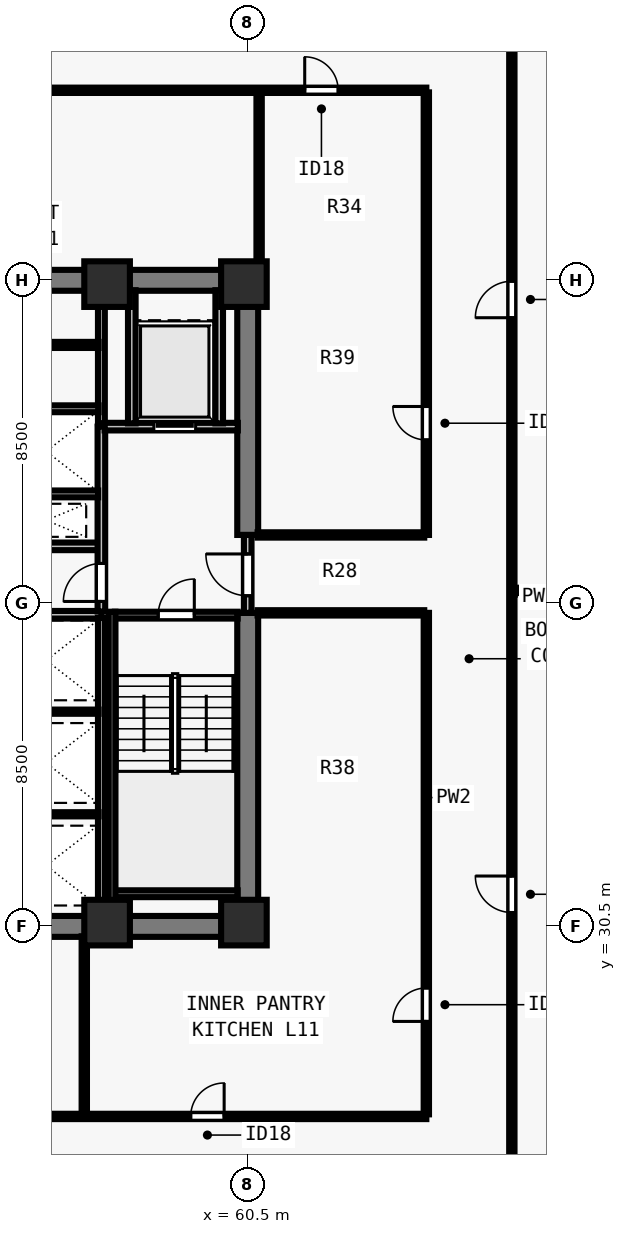
"""IFC4 building model, lengths in metres.
Left out: names, types, materials, properties, quantities, classifications, styles, units other than length and angle.
Written with IfcOpenShell. Run it as: python <this file> out.ifc"""

import sys

from ifc_helpers import new_model, si_unit, direction, frame, frame_2d, origin, origin_2d, place, context, subcontext, project, spatial, rectangle, extrude, element, fill, save


model = new_model("IFC4")
c1 = context("Model", 3, precision=1e-05, world=origin(), true_north=direction((0.0, 1.0)))
c2 = subcontext(c1, "Body", "Model", "MODEL_VIEW")
j1 = project(units=[si_unit("LENGTHUNIT", "METRE"), si_unit("PLANEANGLEUNIT", "RADIAN")], contexts=[c1])
p1 = place(None, origin())
s1 = spatial("IfcSite", under=j1, at=p1, CompositionType="ELEMENT")
p2 = place(p1, origin())
s2 = spatial("IfcBuilding", under=s1, at=p2, CompositionType="ELEMENT")
p3 = place(p2, frame((0.0, 0.0, 44.5)))
s3 = spatial("IfcBuildingStorey", under=s2, at=p3, CompositionType="ELEMENT", Elevation=44.5)
for number, where, z_axis, x_axis in (
    (1, (56.8, 30.6, 0.0), (0.0, 0.0, 1.0), (1.0, 0.0, 0.0)),
    (2, (60.4, 30.6, 0.0), (0.0, 0.0, 1.0), (1.0, 0.0, 0.0)),
    (3, (56.8, 47.4, 0.0), (0.0, 0.0, 1.0), (1.0, 0.0, 0.0)),
    (4, (60.4, 47.4, 0.0), (0.0, 0.0, 1.0), (1.0, 0.0, 0.0)),
):
    element("IfcColumn", number, at=place(p3, frame(where, z_axis=z_axis, x_axis=x_axis)), inside=s3, PredefinedType="COLUMN", context=c2, shape_type="SweptSolid", body=[
        extrude(rectangle(XDim=1.2, YDim=1.2, at=origin_2d()), origin(), (0.0, 0.0, 1.0), 3.5),
    ])
for number, where, z_axis, x_axis in (
    (5, (43.225, 30.5, 0.0), (0.0, 0.0, 1.0), (1.0, 0.0, 0.0)),
    (6, (43.225, 47.5, 0.0), (0.0, 0.0, 1.0), (1.0, 0.0, 0.0)),
):
    element("IfcWall", number, at=place(p3, frame(where, z_axis=z_axis, x_axis=x_axis)), inside=s3, PredefinedType="SHEAR", context=c2, shape_type="SweptSolid", body=[
        extrude(rectangle(XDim=17.55, YDim=0.55, at=frame_2d((8.775, 0.0))), origin(), (0.0, 0.0, 1.0), 3.28),
    ])
p4 = place(p3, frame((60.5, 30.765, 0.0), z_axis=(0.0, 0.0, 1.0), x_axis=(0.0, 1.0, 0.0)))
e7 = element("IfcWall", 7, at=p4, inside=s3, PredefinedType="SHEAR", context=c2, shape_type="SweptSolid", body=[
    extrude(rectangle(XDim=7.985, YDim=0.55, at=frame_2d((3.993, 0.0))), origin(), (0.0, 0.0, 1.0), 3.28),
])
p5 = place(p3, frame((60.5, 40.8, 0.0), z_axis=(0.0, 0.0, 1.0), x_axis=(0.0, 1.0, 0.0)))
e8 = element("IfcWall", 8, at=p5, inside=s3, PredefinedType="SHEAR", context=c2, shape_type="SweptSolid", body=[
    extrude(rectangle(XDim=6.435, YDim=0.55, at=frame_2d((3.218, 0.0))), origin(), (0.0, 0.0, 1.0), 3.28),
])
for number, where, z_axis, x_axis in (
    (9, (53.7, 38.7, 0.0), (0.0, 0.0, 1.0), (1.0, 0.0, 0.0)),
    (10, (53.7, 40.5, 0.0), (0.0, 0.0, 1.0), (1.0, 0.0, 0.0)),
):
    element("IfcWall", number, at=place(p3, frame(where, z_axis=z_axis, x_axis=x_axis)), inside=s3, PredefinedType="SOLIDWALL", context=c2, shape_type="SweptSolid", body=[
        extrude(rectangle(XDim=2.95, YDim=0.2, at=frame_2d((1.475, 0.0))), origin(), (0.0, 0.0, 1.0), 3.28),
    ])
p6 = place(p3, frame((60.5, 38.75, 0.0), z_axis=(0.0, 0.0, 1.0), x_axis=(0.0, 1.0, 0.0)))
e11 = element("IfcWall", 11, at=p6, inside=s3, PredefinedType="SOLIDWALL", context=c2, shape_type="SweptSolid", body=[
    extrude(rectangle(XDim=2.05, YDim=0.2, at=frame_2d((1.025, 0.0))), origin(), (0.0, 0.0, 1.0), 3.28),
])
p7 = place(p6, frame((0.45, 0.0, 0.0)))
e12 = element("IfcOpeningElement", 12, at=p7, cuts=e11, PredefinedType="OPENING", context=c2, shape_type="SweptSolid", body=[
    extrude(rectangle(XDim=1.1, YDim=2.15, at=frame_2d((0.55, 1.075))), frame((0.0, 0.11, 0.0), z_axis=(0.0, -1.0, 0.0), x_axis=(1.0, 0.0, 0.0)), (0.0, 0.0, 1.0), 0.22),
])
p8 = place(p3, frame((56.65, 38.785, 0.0), z_axis=(0.0, 0.0, 1.0), x_axis=(0.0, 1.0, 0.0)))
e13 = element("IfcWall", 13, at=p8, inside=s3, PredefinedType="SOLIDWALL", context=c2, shape_type="SweptSolid", body=[
    extrude(rectangle(XDim=4.865, YDim=0.2, at=frame_2d((2.433, 0.0))), origin(), (0.0, 0.0, 1.0), 3.28),
])
p9 = place(p8, frame((0.265, 0.0, 0.0)))
e14 = element("IfcOpeningElement", 14, at=p9, cuts=e13, PredefinedType="OPENING", context=c2, shape_type="SweptSolid", body=[
    extrude(rectangle(XDim=1.0, YDim=2.15, at=frame_2d((0.5, 1.075))), frame((0.0, 0.11, 0.0), z_axis=(0.0, -1.0, 0.0), x_axis=(1.0, 0.0, 0.0)), (0.0, 0.0, 1.0), 0.22),
])
p10 = place(p3, frame((56.735, 43.65, 0.0), z_axis=(0.0, 0.0, 1.0), x_axis=(1.0, 0.0, 0.0)))
e15 = element("IfcWall", 15, at=p10, inside=s3, PredefinedType="SOLIDWALL", context=c2, shape_type="SweptSolid", body=[
    extrude(rectangle(XDim=3.505, YDim=0.2, at=frame_2d((1.752, 0.0))), origin(), (0.0, 0.0, 1.0), 3.28),
])
p11 = place(p10, frame((1.295, 0.0, 0.0)))
e16 = element("IfcOpeningElement", 16, at=p11, cuts=e15, PredefinedType="OPENING", context=c2, shape_type="SweptSolid", body=[
    extrude(rectangle(XDim=1.1, YDim=2.2, at=frame_2d((0.55, 1.1))), frame((0.0, 0.11, 0.0), z_axis=(0.0, -1.0, 0.0), x_axis=(1.0, 0.0, 0.0)), (0.0, 0.0, 1.0), 0.22),
])
for number, where, z_axis, x_axis in (
    (17, (57.45, 43.735, 0.0), (0.0, 0.0, 1.0), (0.0, 1.0, 0.0)),
    (18, (59.75, 43.735, 0.0), (0.0, 0.0, 1.0), (0.0, 1.0, 0.0)),
):
    element("IfcWall", number, at=place(p3, frame(where, z_axis=z_axis, x_axis=x_axis)), inside=s3, PredefinedType="SOLIDWALL", context=c2, shape_type="SweptSolid", body=[
        extrude(rectangle(XDim=3.505, YDim=0.2, at=frame_2d((1.752, 0.0))), origin(), (0.0, 0.0, 1.0), 3.28),
    ])
p12 = place(p3, frame((56.65, 30.76, 0.0), z_axis=(0.0, 0.0, 1.0), x_axis=(0.0, 1.0, 0.0)))
e19 = element("IfcWall", 19, at=p12, inside=s3, PredefinedType="SOLIDWALL", context=c2, shape_type="SweptSolid", body=[
    extrude(rectangle(XDim=7.855, YDim=0.18, at=frame_2d((3.927, 0.0))), origin(), (0.0, 0.0, 1.0), 3.28),
])
for number, where, z_axis, x_axis in (
    (20, (53.785, 33.45, 0.0), (0.0, 0.0, 1.0), (1.0, 0.0, 0.0)),
    (21, (53.785, 36.15, 0.0), (0.0, 0.0, 1.0), (1.0, 0.0, 0.0)),
):
    element("IfcWall", number, at=place(p3, frame(where, z_axis=z_axis, x_axis=x_axis)), inside=s3, PredefinedType="PARTITIONING", context=c2, shape_type="SweptSolid", body=[
        extrude(rectangle(XDim=2.79, YDim=0.11, at=frame_2d((1.395, 0.0))), origin(), (0.0, 0.0, 1.0), 3.28),
    ])
p13 = place(p3, frame((56.65, 43.735, 0.0), z_axis=(0.0, 0.0, 1.0), x_axis=(0.0, 1.0, 0.0)))
e22 = element("IfcWall", 22, at=p13, inside=s3, PredefinedType="SOLIDWALL", context=c2, shape_type="SweptSolid", body=[
    extrude(rectangle(XDim=3.505, YDim=0.18, at=frame_2d((1.752, 0.0))), origin(), (0.0, 0.0, 1.0), 3.28),
])
p14 = place(p3, frame((53.785, 41.88, 0.0), z_axis=(0.0, 0.0, 1.0), x_axis=(1.0, 0.0, 0.0)))
e23 = element("IfcWall", 23, at=p14, inside=s3, PredefinedType="SOLIDWALL", context=c2, shape_type="SweptSolid", body=[
    extrude(rectangle(XDim=2.78, YDim=0.18, at=frame_2d((1.39, 0.0))), origin(), (0.0, 0.0, 1.0), 3.28),
])
p15 = place(p3, frame((53.785, 44.12, 0.0), z_axis=(0.0, 0.0, 1.0), x_axis=(1.0, 0.0, 0.0)))
e24 = element("IfcWall", 24, at=p15, inside=s3, PredefinedType="SOLIDWALL", context=c2, shape_type="SweptSolid", body=[
    extrude(rectangle(XDim=2.79, YDim=0.18, at=frame_2d((1.395, 0.0))), origin(), (0.0, 0.0, 1.0), 3.28),
])
p16 = place(p3, frame((53.785, 45.8, 0.0), z_axis=(0.0, 0.0, 1.0), x_axis=(1.0, 0.0, 0.0)))
e25 = element("IfcWall", 25, at=p16, inside=s3, PredefinedType="PARTITIONING", context=c2, shape_type="SweptSolid", body=[
    extrude(rectangle(XDim=2.79, YDim=0.16, at=frame_2d((1.395, 0.0))), origin(), (0.0, 0.0, 1.0), 3.28),
])
p17 = place(p3, frame((67.45, 23.305, 0.0), z_axis=(0.0, 0.0, 1.0), x_axis=(0.0, 1.0, 0.0)))
e26 = element("IfcWall", 26, at=p17, inside=s3, PredefinedType="PARTITIONING", context=c2, shape_type="SweptSolid", body=[
    extrude(rectangle(XDim=31.39, YDim=0.14, at=frame_2d((15.695, 0.0))), origin(), (0.0, 0.0, 1.0), 3.28),
])
p18 = place(p17, frame((7.561, 0.0, 0.0)))
e27 = element("IfcOpeningElement", 27, at=p18, cuts=e26, PredefinedType="OPENING", context=c2, shape_type="SweptSolid", body=[
    extrude(rectangle(XDim=0.96, YDim=2.12, at=frame_2d((0.48, 1.06))), frame((0.0, 0.08, 0.0), z_axis=(0.0, -1.0, 0.0), x_axis=(1.0, 0.0, 0.0)), (0.0, 0.0, 1.0), 0.16),
])
p19 = place(p17, frame((23.211, 0.0, 0.0)))
e28 = element("IfcOpeningElement", 28, at=p19, cuts=e26, PredefinedType="OPENING", context=c2, shape_type="SweptSolid", body=[
    extrude(rectangle(XDim=0.96, YDim=2.12, at=frame_2d((0.48, 1.06))), frame((0.0, 0.08, 0.0), z_axis=(0.0, -1.0, 0.0), x_axis=(1.0, 0.0, 0.0)), (0.0, 0.0, 1.0), 0.16),
])
p20 = place(p3, frame((38.8, 25.5, 0.0), z_axis=(0.0, 0.0, 1.0), x_axis=(1.0, 0.0, 0.0)))
e29 = element("IfcWall", 29, at=p20, inside=s3, PredefinedType="PARTITIONING", context=c2, shape_type="SweptSolid", body=[
    extrude(rectangle(XDim=26.4, YDim=0.14, at=frame_2d((13.2, 0.0))), origin(), (0.0, 0.0, 1.0), 3.28),
])
p21 = place(p20, frame((1.2, 0.0, 0.0)))
e30 = element("IfcOpeningElement", 30, at=p21, cuts=e29, PredefinedType="OPENING", context=c2, shape_type="SweptSolid", body=[
    extrude(rectangle(XDim=0.88, YDim=2.1, at=frame_2d((0.44, 1.05))), frame((0.0, 0.08, 0.0), z_axis=(0.0, -1.0, 0.0), x_axis=(1.0, 0.0, 0.0)), (0.0, 0.0, 1.0), 0.16),
])
p22 = place(p20, frame((9.7, 0.0, 0.0)))
e31 = element("IfcOpeningElement", 31, at=p22, cuts=e29, PredefinedType="OPENING", context=c2, shape_type="SweptSolid", body=[
    extrude(rectangle(XDim=0.88, YDim=2.1, at=frame_2d((0.44, 1.05))), frame((0.0, 0.08, 0.0), z_axis=(0.0, -1.0, 0.0), x_axis=(1.0, 0.0, 0.0)), (0.0, 0.0, 1.0), 0.16),
])
p23 = place(p20, frame((20.2, 0.0, 0.0)))
e32 = element("IfcOpeningElement", 32, at=p23, cuts=e29, PredefinedType="OPENING", context=c2, shape_type="SweptSolid", body=[
    extrude(rectangle(XDim=0.88, YDim=2.1, at=frame_2d((0.44, 1.05))), frame((0.0, 0.08, 0.0), z_axis=(0.0, -1.0, 0.0), x_axis=(1.0, 0.0, 0.0)), (0.0, 0.0, 1.0), 0.16),
])
p24 = place(p3, frame((38.8, 52.5, 0.0), z_axis=(0.0, 0.0, 1.0), x_axis=(1.0, 0.0, 0.0)))
e33 = element("IfcWall", 33, at=p24, inside=s3, PredefinedType="PARTITIONING", context=c2, shape_type="SweptSolid", body=[
    extrude(rectangle(XDim=26.4, YDim=0.14, at=frame_2d((13.2, 0.0))), origin(), (0.0, 0.0, 1.0), 3.28),
])
p25 = place(p24, frame((2.2, 0.0, 0.0)))
e34 = element("IfcOpeningElement", 34, at=p25, cuts=e33, PredefinedType="OPENING", context=c2, shape_type="SweptSolid", body=[
    extrude(rectangle(XDim=0.88, YDim=2.1, at=frame_2d((0.44, 1.05))), frame((0.0, 0.08, 0.0), z_axis=(0.0, -1.0, 0.0), x_axis=(1.0, 0.0, 0.0)), (0.0, 0.0, 1.0), 0.16),
])
p26 = place(p24, frame((13.7, 0.0, 0.0)))
e35 = element("IfcOpeningElement", 35, at=p26, cuts=e33, PredefinedType="OPENING", context=c2, shape_type="SweptSolid", body=[
    extrude(rectangle(XDim=0.88, YDim=2.1, at=frame_2d((0.44, 1.05))), frame((0.0, 0.08, 0.0), z_axis=(0.0, -1.0, 0.0), x_axis=(1.0, 0.0, 0.0)), (0.0, 0.0, 1.0), 0.16),
])
p27 = place(p24, frame((23.2, 0.0, 0.0)))
e36 = element("IfcOpeningElement", 36, at=p27, cuts=e33, PredefinedType="OPENING", context=c2, shape_type="SweptSolid", body=[
    extrude(rectangle(XDim=0.88, YDim=2.1, at=frame_2d((0.44, 1.05))), frame((0.0, 0.08, 0.0), z_axis=(0.0, -1.0, 0.0), x_axis=(1.0, 0.0, 0.0)), (0.0, 0.0, 1.0), 0.16),
])
p28 = place(p3, frame((65.2, 25.555, 0.0), z_axis=(0.0, 0.0, 1.0), x_axis=(0.0, 1.0, 0.0)))
e37 = element("IfcWall", 37, at=p28, inside=s3, PredefinedType="PARTITIONING", context=c2, shape_type="SweptSolid", body=[
    extrude(rectangle(XDim=13.195, YDim=0.14, at=frame_2d((6.598, 0.0))), origin(), (0.0, 0.0, 1.0), 3.28),
])
p29 = place(p28, frame((2.445, 0.0, 0.0)))
e38 = element("IfcOpeningElement", 38, at=p29, cuts=e37, PredefinedType="OPENING", context=c2, shape_type="SweptSolid", body=[
    extrude(rectangle(XDim=0.88, YDim=2.1, at=frame_2d((0.44, 1.05))), frame((0.0, 0.08, 0.0), z_axis=(0.0, -1.0, 0.0), x_axis=(1.0, 0.0, 0.0)), (0.0, 0.0, 1.0), 0.16),
])
p30 = place(p3, frame((65.2, 40.8, 0.0), z_axis=(0.0, 0.0, 1.0), x_axis=(0.0, 1.0, 0.0)))
e39 = element("IfcWall", 39, at=p30, inside=s3, PredefinedType="PARTITIONING", context=c2, shape_type="SweptSolid", body=[
    extrude(rectangle(XDim=11.645, YDim=0.14, at=frame_2d((5.823, 0.0))), origin(), (0.0, 0.0, 1.0), 3.28),
])
p31 = place(p30, frame((2.5, 0.0, 0.0)))
e40 = element("IfcOpeningElement", 40, at=p31, cuts=e39, PredefinedType="OPENING", context=c2, shape_type="SweptSolid", body=[
    extrude(rectangle(XDim=0.88, YDim=2.1, at=frame_2d((0.44, 1.05))), frame((0.0, 0.08, 0.0), z_axis=(0.0, -1.0, 0.0), x_axis=(1.0, 0.0, 0.0)), (0.0, 0.0, 1.0), 0.16),
])
for number, where, z_axis, x_axis in (
    (41, (60.76, 38.75, 0.0), (0.0, 0.0, 1.0), (1.0, 0.0, 0.0)),
    (42, (60.76, 40.8, 0.0), (0.0, 0.0, 1.0), (1.0, 0.0, 0.0)),
):
    element("IfcWall", number, at=place(p3, frame(where, z_axis=z_axis, x_axis=x_axis)), inside=s3, PredefinedType="PARTITIONING", context=c2, shape_type="SweptSolid", body=[
        extrude(rectangle(XDim=4.385, YDim=0.14, at=frame_2d((2.192, 0.0))), origin(), (0.0, 0.0, 1.0), 3.28),
    ])
p32 = place(p3, frame((56.2, 25.555, 0.0), z_axis=(0.0, 0.0, 1.0), x_axis=(0.0, 1.0, 0.0)))
e43 = element("IfcWall", 43, at=p32, inside=s3, PredefinedType="PARTITIONING", context=c2, shape_type="SweptSolid", body=[
    extrude(rectangle(XDim=4.685, YDim=0.14, at=frame_2d((2.343, 0.0))), origin(), (0.0, 0.0, 1.0), 2.849),
])
p33 = place(p3, frame((60.8, 47.76, 0.0), z_axis=(0.0, 0.0, 1.0), x_axis=(0.0, 1.0, 0.0)))
e44 = element("IfcWall", 44, at=p33, inside=s3, PredefinedType="PARTITIONING", context=c2, shape_type="SweptSolid", body=[
    extrude(rectangle(XDim=4.685, YDim=0.14, at=frame_2d((2.343, 0.0))), origin(), (0.0, 0.0, 1.0), 2.439),
])
p34 = place(p3, frame((67.55, 39.341, 0.0), z_axis=(0.0, 0.0, 1.0), x_axis=(1.0, 0.0, 0.0)))
e45 = element("IfcWall", 45, at=p34, inside=s3, PredefinedType="PARTITIONING", context=c2, shape_type="SweptSolid", body=[
    extrude(rectangle(XDim=9.53, YDim=0.14, at=frame_2d((4.765, 0.0))), origin(), (0.0, 0.0, 1.0), 3.28),
])
p35 = place(p3, frame((57.005, 38.69, 0.0), z_axis=(0.0, 0.0, 1.0), x_axis=(1.0, 0.0, 0.0)))
e46 = element("IfcWall", 46, at=p35, inside=s3, PredefinedType="SOLIDWALL", context=c2, shape_type="SweptSolid", body=[
    extrude(rectangle(XDim=3.23, YDim=0.18, at=frame_2d((1.615, 0.0))), origin(), (0.0, 0.0, 1.0), 3.28),
])
p36 = place(p35, frame((1.14, 0.0, 0.0)))
e47 = element("IfcOpeningElement", 47, at=p36, cuts=e46, PredefinedType="OPENING", context=c2, shape_type="SweptSolid", body=[
    extrude(rectangle(XDim=0.95, YDim=2.15, at=frame_2d((0.475, 1.075))), frame((0.0, 0.1, 0.0), z_axis=(0.0, -1.0, 0.0), x_axis=(1.0, 0.0, 0.0)), (0.0, 0.0, 1.0), 0.2),
])
p37 = place(p3, frame((57.005, 31.36, 0.0), z_axis=(0.0, 0.0, 1.0), x_axis=(1.0, 0.0, 0.0)))
e48 = element("IfcWall", 48, at=p37, inside=s3, PredefinedType="SOLIDWALL", context=c2, shape_type="SweptSolid", body=[
    extrude(rectangle(XDim=3.23, YDim=0.18, at=frame_2d((1.615, 0.0))), origin(), (0.0, 0.0, 1.0), 3.28),
])
p38 = place(p3, frame((56.93, 38.78, 0.0), z_axis=(0.0, 0.0, 1.0), x_axis=(0.0, -1.0, 0.0)))
e49 = element("IfcWall", 49, at=p38, inside=s3, PredefinedType="SOLIDWALL", context=c2, shape_type="SweptSolid", body=[
    extrude(rectangle(XDim=8.017, YDim=0.18, at=frame_2d((4.009, 0.0))), origin(), (0.0, 0.0, 1.0), 3.28),
])
p39 = place(p7, origin())
e50 = element("IfcDoor", 50, at=p39, inside=s3, OperationType="SINGLE_SWING_RIGHT", PredefinedType="DOOR", context=c2, shape_type="SweptSolid", body=[
    extrude(rectangle(XDim=1.1, YDim=2.15, at=frame_2d((0.55, 1.075))), frame((0.0, 0.025, 0.0), z_axis=(0.0, -1.0, 0.0), x_axis=(1.0, 0.0, 0.0)), (0.0, 0.0, 1.0), 0.05),
])
fill(e12, e50)
p40 = place(p9, origin())
e51 = element("IfcDoor", 51, at=p40, inside=s3, OperationType="SINGLE_SWING_LEFT", PredefinedType="DOOR", context=c2, shape_type="SweptSolid", body=[
    extrude(rectangle(XDim=1.0, YDim=2.15, at=frame_2d((0.5, 1.075))), frame((0.0, 0.025, 0.0), z_axis=(0.0, -1.0, 0.0), x_axis=(1.0, 0.0, 0.0)), (0.0, 0.0, 1.0), 0.05),
])
fill(e14, e51)
p41 = place(p11, origin())
e52 = element("IfcDoor", 52, at=p41, inside=s3, OperationType="SLIDING_TO_LEFT", PredefinedType="DOOR", context=c2, shape_type="SweptSolid", body=[
    extrude(rectangle(XDim=1.1, YDim=2.2, at=frame_2d((0.55, 1.1))), frame((0.0, 0.025, 0.0), z_axis=(0.0, -1.0, 0.0), x_axis=(1.0, 0.0, 0.0)), (0.0, 0.0, 1.0), 0.05),
])
fill(e16, e52)
p42 = place(p23, origin())
e53 = element("IfcDoor", 53, at=p42, inside=s3, OperationType="SINGLE_SWING_RIGHT", PredefinedType="DOOR", context=c2, shape_type="SweptSolid", body=[
    extrude(rectangle(XDim=0.88, YDim=2.1, at=frame_2d((0.44, 1.05))), frame((0.0, 0.025, 0.0), z_axis=(0.0, -1.0, 0.0), x_axis=(1.0, 0.0, 0.0)), (0.0, 0.0, 1.0), 0.05),
])
fill(e32, e53)
p43 = place(p27, origin())
e54 = element("IfcDoor", 54, at=p43, inside=s3, OperationType="SINGLE_SWING_LEFT", PredefinedType="DOOR", context=c2, shape_type="SweptSolid", body=[
    extrude(rectangle(XDim=0.88, YDim=2.1, at=frame_2d((0.44, 1.05))), frame((0.0, 0.025, 0.0), z_axis=(0.0, -1.0, 0.0), x_axis=(1.0, 0.0, 0.0)), (0.0, 0.0, 1.0), 0.05),
])
fill(e36, e54)
p44 = place(p29, origin())
e55 = element("IfcDoor", 55, at=p44, inside=s3, OperationType="SINGLE_SWING_LEFT", PredefinedType="DOOR", context=c2, shape_type="SweptSolid", body=[
    extrude(rectangle(XDim=0.88, YDim=2.1, at=frame_2d((0.44, 1.05))), frame((0.0, 0.025, 0.0), z_axis=(0.0, -1.0, 0.0), x_axis=(1.0, 0.0, 0.0)), (0.0, 0.0, 1.0), 0.05),
])
fill(e38, e55)
p45 = place(p31, origin())
e56 = element("IfcDoor", 56, at=p45, inside=s3, OperationType="SINGLE_SWING_RIGHT", PredefinedType="DOOR", context=c2, shape_type="SweptSolid", body=[
    extrude(rectangle(XDim=0.88, YDim=2.1, at=frame_2d((0.44, 1.05))), frame((0.0, 0.025, 0.0), z_axis=(0.0, -1.0, 0.0), x_axis=(1.0, 0.0, 0.0)), (0.0, 0.0, 1.0), 0.05),
])
fill(e40, e56)
p46 = place(p18, origin())
e57 = element("IfcDoor", 57, at=p46, inside=s3, OperationType="SINGLE_SWING_RIGHT", PredefinedType="DOOR", context=c2, shape_type="SweptSolid", body=[
    extrude(rectangle(XDim=0.96, YDim=2.12, at=frame_2d((0.48, 1.06))), frame((0.0, 0.025, 0.0), z_axis=(0.0, -1.0, 0.0), x_axis=(1.0, 0.0, 0.0)), (0.0, 0.0, 1.0), 0.05),
])
fill(e27, e57)
p47 = place(p19, origin())
e58 = element("IfcDoor", 58, at=p47, inside=s3, OperationType="SINGLE_SWING_LEFT", PredefinedType="DOOR", context=c2, shape_type="SweptSolid", body=[
    extrude(rectangle(XDim=0.96, YDim=2.12, at=frame_2d((0.48, 1.06))), frame((0.0, 0.025, 0.0), z_axis=(0.0, -1.0, 0.0), x_axis=(1.0, 0.0, 0.0)), (0.0, 0.0, 1.0), 0.05),
])
fill(e28, e58)
p48 = place(p36, origin())
e59 = element("IfcDoor", 59, at=p48, inside=s3, OperationType="SINGLE_SWING_RIGHT", PredefinedType="DOOR", context=c2, shape_type="SweptSolid", body=[
    extrude(rectangle(XDim=0.95, YDim=2.15, at=frame_2d((0.475, 1.075))), frame((0.0, 0.025, 0.0), z_axis=(0.0, -1.0, 0.0), x_axis=(1.0, 0.0, 0.0)), (0.0, 0.0, 1.0), 0.05),
])
fill(e47, e59)
save(model, sys.argv[1])
